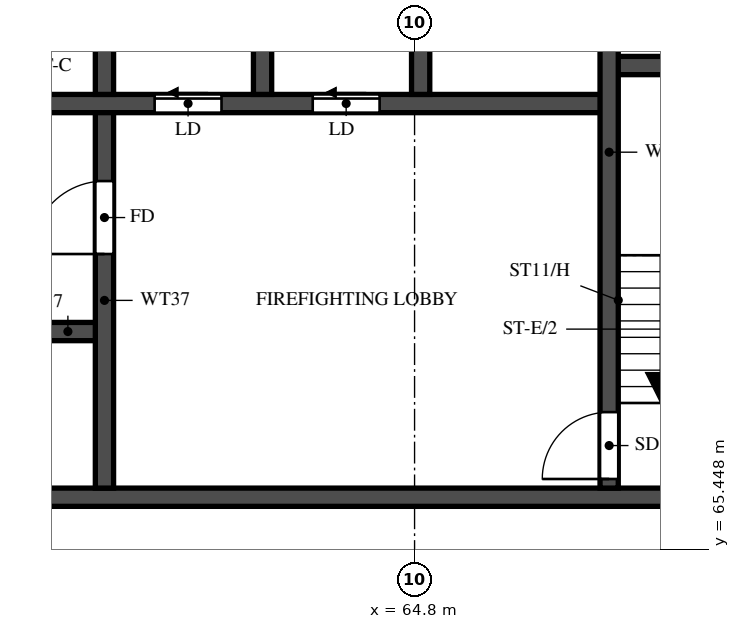
"""IFC4 building model, lengths in metres.
Left out: names, types, materials, properties, quantities, classifications, styles, units other than length and angle.
Written with IfcOpenShell. Run it as: python <this file> out.ifc"""

import sys

from ifc_helpers import new_model, si_unit, direction, frame, frame_2d, origin, place, context, subcontext, project, spatial, rectangle, extrude, element, fill, save


model = new_model("IFC4")
c1 = context("Model", 3, precision=1e-05, world=origin(), true_north=direction((0.0, 1.0)))
c2 = subcontext(c1, "Body", "Model", "MODEL_VIEW")
j1 = project(units=[si_unit("LENGTHUNIT", "METRE"), si_unit("PLANEANGLEUNIT", "RADIAN")], contexts=[c1])
p1 = place(None, origin())
s1 = spatial("IfcSite", under=j1, at=p1, CompositionType="ELEMENT")
p2 = place(p1, origin())
s2 = spatial("IfcBuilding", under=s1, at=p2, CompositionType="ELEMENT")
p3 = place(p2, frame((0.0, 0.0, 257.0)))
s3 = spatial("IfcBuildingStorey", under=s2, at=p3, CompositionType="ELEMENT", Elevation=257.0)
p4 = place(p3, frame((29.2, 66.3, 0.0), z_axis=(0.0, 0.0, 1.0), x_axis=(1.0, 0.0, 0.0)))
e1 = element("IfcWall", 1, at=p4, inside=s3, PredefinedType="SHEAR", context=c2, shape_type="SweptSolid", body=[
    extrude(rectangle(XDim=42.4, YDim=0.3, at=frame_2d((21.2, 0.0))), origin(), (0.0, 0.0, 1.0), 3.22),
])
p5 = place(p4, frame((1.425, 0.0, 0.0)))
e2 = element("IfcOpeningElement", 2, at=p5, cuts=e1, PredefinedType="OPENING", context=c2, shape_type="SweptSolid", body=[
    extrude(rectangle(XDim=1.1, YDim=2.1, at=frame_2d((0.55, 1.05))), frame((0.0, 0.16, 0.0), z_axis=(0.0, -1.0, 0.0), x_axis=(1.0, 0.0, 0.0)), (0.0, 0.0, 1.0), 0.32),
])
p6 = place(p4, frame((4.2, 0.0, 0.0)))
e3 = element("IfcOpeningElement", 3, at=p6, cuts=e1, PredefinedType="OPENING", context=c2, shape_type="SweptSolid", body=[
    extrude(rectangle(XDim=1.8, YDim=2.1, at=frame_2d((0.9, 1.05))), frame((0.0, 0.16, 0.0), z_axis=(0.0, -1.0, 0.0), x_axis=(1.0, 0.0, 0.0)), (0.0, 0.0, 1.0), 0.32),
])
p7 = place(p3, frame((35.65, 69.025, 0.0), z_axis=(0.0, 0.0, 1.0), x_axis=(1.0, 0.0, 0.0)))
e4 = element("IfcWall", 4, at=p7, inside=s3, PredefinedType="SHEAR", context=c2, shape_type="SweptSolid", body=[
    extrude(rectangle(XDim=24.05, YDim=0.3, at=frame_2d((12.025, 0.0))), origin(), (0.0, 0.0, 1.0), 3.22),
])
p8 = place(p7, frame((0.975, 0.0, 0.0)))
e5 = element("IfcOpeningElement", 5, at=p8, cuts=e4, PredefinedType="OPENING", context=c2, shape_type="SweptSolid", body=[
    extrude(rectangle(XDim=1.1, YDim=2.1, at=frame_2d((0.55, 1.05))), frame((0.0, 0.16, 0.0), z_axis=(0.0, -1.0, 0.0), x_axis=(1.0, 0.0, 0.0)), (0.0, 0.0, 1.0), 0.32),
])
p9 = place(p7, frame((3.725, 0.0, 0.0)))
e6 = element("IfcOpeningElement", 6, at=p9, cuts=e4, PredefinedType="OPENING", context=c2, shape_type="SweptSolid", body=[
    extrude(rectangle(XDim=1.1, YDim=2.1, at=frame_2d((0.55, 1.05))), frame((0.0, 0.16, 0.0), z_axis=(0.0, -1.0, 0.0), x_axis=(1.0, 0.0, 0.0)), (0.0, 0.0, 1.0), 0.32),
])
p10 = place(p7, frame((6.475, 0.0, 0.0)))
e7 = element("IfcOpeningElement", 7, at=p10, cuts=e4, PredefinedType="OPENING", context=c2, shape_type="SweptSolid", body=[
    extrude(rectangle(XDim=1.1, YDim=2.1, at=frame_2d((0.55, 1.05))), frame((0.0, 0.16, 0.0), z_axis=(0.0, -1.0, 0.0), x_axis=(1.0, 0.0, 0.0)), (0.0, 0.0, 1.0), 0.32),
])
p11 = place(p7, frame((9.225, 0.0, 0.0)))
e8 = element("IfcOpeningElement", 8, at=p11, cuts=e4, PredefinedType="OPENING", context=c2, shape_type="SweptSolid", body=[
    extrude(rectangle(XDim=1.1, YDim=2.1, at=frame_2d((0.55, 1.05))), frame((0.0, 0.16, 0.0), z_axis=(0.0, -1.0, 0.0), x_axis=(1.0, 0.0, 0.0)), (0.0, 0.0, 1.0), 0.32),
])
p12 = place(p7, frame((11.975, 0.0, 0.0)))
e9 = element("IfcOpeningElement", 9, at=p12, cuts=e4, PredefinedType="OPENING", context=c2, shape_type="SweptSolid", body=[
    extrude(rectangle(XDim=1.1, YDim=2.1, at=frame_2d((0.55, 1.05))), frame((0.0, 0.16, 0.0), z_axis=(0.0, -1.0, 0.0), x_axis=(1.0, 0.0, 0.0)), (0.0, 0.0, 1.0), 0.32),
])
p13 = place(p7, frame((14.725, 0.0, 0.0)))
e10 = element("IfcOpeningElement", 10, at=p13, cuts=e4, PredefinedType="OPENING", context=c2, shape_type="SweptSolid", body=[
    extrude(rectangle(XDim=1.1, YDim=2.1, at=frame_2d((0.55, 1.05))), frame((0.0, 0.16, 0.0), z_axis=(0.0, -1.0, 0.0), x_axis=(1.0, 0.0, 0.0)), (0.0, 0.0, 1.0), 0.32),
])
p14 = place(p7, frame((17.6, 0.0, 0.0)))
e11 = element("IfcOpeningElement", 11, at=p14, cuts=e4, PredefinedType="OPENING", context=c2, shape_type="SweptSolid", body=[
    extrude(rectangle(XDim=1.1, YDim=2.1, at=frame_2d((0.55, 1.05))), frame((0.0, 0.16, 0.0), z_axis=(0.0, -1.0, 0.0), x_axis=(1.0, 0.0, 0.0)), (0.0, 0.0, 1.0), 0.32),
])
p15 = place(p7, frame((20.6, 0.0, 0.0)))
e12 = element("IfcOpeningElement", 12, at=p15, cuts=e4, PredefinedType="OPENING", context=c2, shape_type="SweptSolid", body=[
    extrude(rectangle(XDim=1.1, YDim=2.1, at=frame_2d((0.55, 1.05))), frame((0.0, 0.16, 0.0), z_axis=(0.0, -1.0, 0.0), x_axis=(1.0, 0.0, 0.0)), (0.0, 0.0, 1.0), 0.32),
])
p16 = place(p3, frame((32.8, 72.775, 0.0), z_axis=(0.0, 0.0, 1.0), x_axis=(1.0, 0.0, 0.0)))
e13 = element("IfcWall", 13, at=p16, inside=s3, PredefinedType="SHEAR", context=c2, shape_type="SweptSolid", body=[
    extrude(rectangle(XDim=35.2, YDim=0.3, at=frame_2d((17.6, 0.0))), origin(), (0.0, 0.0, 1.0), 3.22),
])
p17 = place(p16, frame((19.8, 0.0, 0.0)))
e14 = element("IfcOpeningElement", 14, at=p17, cuts=e13, PredefinedType="OPENING", context=c2, shape_type="SweptSolid", body=[
    extrude(rectangle(XDim=1.1, YDim=2.1, at=frame_2d((0.55, 1.05))), frame((0.0, 0.16, 0.0), z_axis=(0.0, -1.0, 0.0), x_axis=(1.0, 0.0, 0.0)), (0.0, 0.0, 1.0), 0.32),
])
p18 = place(p16, frame((27.725, 0.0, 0.0)))
e15 = element("IfcOpeningElement", 15, at=p18, cuts=e13, PredefinedType="OPENING", context=c2, shape_type="SweptSolid", body=[
    extrude(rectangle(XDim=1.1, YDim=2.1, at=frame_2d((0.55, 1.05))), frame((0.0, 0.16, 0.0), z_axis=(0.0, -1.0, 0.0), x_axis=(1.0, 0.0, 0.0)), (0.0, 0.0, 1.0), 0.32),
])
p19 = place(p16, frame((30.325, 0.0, 0.0)))
e16 = element("IfcOpeningElement", 16, at=p19, cuts=e13, PredefinedType="OPENING", context=c2, shape_type="SweptSolid", body=[
    extrude(rectangle(XDim=1.1, YDim=2.1, at=frame_2d((0.55, 1.05))), frame((0.0, 0.16, 0.0), z_axis=(0.0, -1.0, 0.0), x_axis=(1.0, 0.0, 0.0)), (0.0, 0.0, 1.0), 0.32),
])
p20 = place(p16, frame((3.825, 0.0, 0.0)))
e17 = element("IfcOpeningElement", 17, at=p20, cuts=e13, PredefinedType="OPENING", context=c2, shape_type="SweptSolid", body=[
    extrude(rectangle(XDim=1.1, YDim=2.1, at=frame_2d((0.55, 1.05))), frame((0.0, 0.16, 0.0), z_axis=(0.0, -1.0, 0.0), x_axis=(1.0, 0.0, 0.0)), (0.0, 0.0, 1.0), 0.32),
])
p21 = place(p16, frame((6.575, 0.0, 0.0)))
e18 = element("IfcOpeningElement", 18, at=p21, cuts=e13, PredefinedType="OPENING", context=c2, shape_type="SweptSolid", body=[
    extrude(rectangle(XDim=1.1, YDim=2.1, at=frame_2d((0.55, 1.05))), frame((0.0, 0.16, 0.0), z_axis=(0.0, -1.0, 0.0), x_axis=(1.0, 0.0, 0.0)), (0.0, 0.0, 1.0), 0.32),
])
p22 = place(p16, frame((9.325, 0.0, 0.0)))
e19 = element("IfcOpeningElement", 19, at=p22, cuts=e13, PredefinedType="OPENING", context=c2, shape_type="SweptSolid", body=[
    extrude(rectangle(XDim=1.1, YDim=2.1, at=frame_2d((0.55, 1.05))), frame((0.0, 0.16, 0.0), z_axis=(0.0, -1.0, 0.0), x_axis=(1.0, 0.0, 0.0)), (0.0, 0.0, 1.0), 0.32),
])
p23 = place(p16, frame((12.075, 0.0, 0.0)))
e20 = element("IfcOpeningElement", 20, at=p23, cuts=e13, PredefinedType="OPENING", context=c2, shape_type="SweptSolid", body=[
    extrude(rectangle(XDim=1.1, YDim=2.1, at=frame_2d((0.55, 1.05))), frame((0.0, 0.16, 0.0), z_axis=(0.0, -1.0, 0.0), x_axis=(1.0, 0.0, 0.0)), (0.0, 0.0, 1.0), 0.32),
])
p24 = place(p16, frame((14.825, 0.0, 0.0)))
e21 = element("IfcOpeningElement", 21, at=p24, cuts=e13, PredefinedType="OPENING", context=c2, shape_type="SweptSolid", body=[
    extrude(rectangle(XDim=1.1, YDim=2.1, at=frame_2d((0.55, 1.05))), frame((0.0, 0.16, 0.0), z_axis=(0.0, -1.0, 0.0), x_axis=(1.0, 0.0, 0.0)), (0.0, 0.0, 1.0), 0.32),
])
p25 = place(p16, frame((17.575, 0.0, 0.0)))
e22 = element("IfcOpeningElement", 22, at=p25, cuts=e13, PredefinedType="OPENING", context=c2, shape_type="SweptSolid", body=[
    extrude(rectangle(XDim=1.1, YDim=2.1, at=frame_2d((0.55, 1.05))), frame((0.0, 0.16, 0.0), z_axis=(0.0, -1.0, 0.0), x_axis=(1.0, 0.0, 0.0)), (0.0, 0.0, 1.0), 0.32),
])
p26 = place(p16, frame((0.95, 0.0, 0.0)))
e23 = element("IfcOpeningElement", 23, at=p26, cuts=e13, PredefinedType="OPENING", context=c2, shape_type="SweptSolid", body=[
    extrude(rectangle(XDim=1.1, YDim=2.1, at=frame_2d((0.55, 1.05))), frame((0.0, 0.16, 0.0), z_axis=(0.0, -1.0, 0.0), x_axis=(1.0, 0.0, 0.0)), (0.0, 0.0, 1.0), 0.32),
])
p27 = place(p3, frame((68.0, 73.4, 0.0), z_axis=(0.0, 0.0, 1.0), x_axis=(1.0, 0.0, 0.0)))
e24 = element("IfcWall", 24, at=p27, inside=s3, PredefinedType="SHEAR", context=c2, shape_type="SweptSolid", body=[
    extrude(rectangle(XDim=3.1, YDim=0.3, at=frame_2d((1.55, 0.0))), origin(), (0.0, 0.0, 1.0), 3.22),
])
p28 = place(p3, frame((68.0, 66.45, 0.0), z_axis=(0.0, 0.0, 1.0), x_axis=(0.0, 1.0, 0.0)))
e25 = element("IfcWall", 25, at=p28, inside=s3, PredefinedType="SHEAR", context=c2, shape_type="SweptSolid", body=[
    extrude(rectangle(XDim=11.05, YDim=0.3, at=frame_2d((5.525, 0.0))), origin(), (0.0, 0.0, 1.0), 3.22),
])
p29 = place(p28, frame((0.15, 0.0, 0.0)))
e26 = element("IfcOpeningElement", 26, at=p29, cuts=e25, PredefinedType="OPENING", context=c2, shape_type="SweptSolid", body=[
    extrude(rectangle(XDim=1.1, YDim=2.1, at=frame_2d((0.55, 1.05))), frame((0.0, 0.16, 0.0), z_axis=(0.0, -1.0, 0.0), x_axis=(1.0, 0.0, 0.0)), (0.0, 0.0, 1.0), 0.32),
])
p30 = place(p3, frame((59.7, 66.45, 0.0), z_axis=(0.0, 0.0, 1.0), x_axis=(0.0, 1.0, 0.0)))
e27 = element("IfcWall", 27, at=p30, inside=s3, PredefinedType="SHEAR", context=c2, shape_type="SweptSolid", body=[
    extrude(rectangle(XDim=6.175, YDim=0.3, at=frame_2d((3.087, 0.0))), origin(), (0.0, 0.0, 1.0), 3.22),
])
p31 = place(p30, frame((3.85, 0.0, 0.0)))
e28 = element("IfcOpeningElement", 28, at=p31, cuts=e27, PredefinedType="OPENING", context=c2, shape_type="SweptSolid", body=[
    extrude(rectangle(XDim=1.2, YDim=2.1, at=frame_2d((0.6, 1.05))), frame((0.0, 0.16, 0.0), z_axis=(0.0, -1.0, 0.0), x_axis=(1.0, 0.0, 0.0)), (0.0, 0.0, 1.0), 0.32),
])
for number, where, z_axis, x_axis in (
    (29, (59.7, 72.925, 0.0), (0.0, 0.0, 1.0), (0.0, 1.0, 0.0)),
    (30, (62.3, 72.925, 0.0), (0.0, 0.0, 1.0), (0.0, 1.0, 0.0)),
    (31, (64.9, 72.925, 0.0), (0.0, 0.0, 1.0), (0.0, 1.0, 0.0)),
):
    element("IfcWall", number, at=place(p3, frame(where, z_axis=z_axis, x_axis=x_axis)), inside=s3, PredefinedType="SHEAR", context=c2, shape_type="SweptSolid", body=[
        extrude(rectangle(XDim=2.95, YDim=0.3, at=frame_2d((1.475, 0.0))), origin(), (0.0, 0.0, 1.0), 3.22),
    ])
p32 = place(p29, origin())
e32 = element("IfcDoor", 32, at=p32, inside=s3, OperationType="SINGLE_SWING_RIGHT", PredefinedType="DOOR", context=c2, shape_type="SweptSolid", body=[
    extrude(rectangle(XDim=1.1, YDim=2.1, at=frame_2d((0.55, 1.05))), frame((0.0, 0.025, 0.0), z_axis=(0.0, -1.0, 0.0), x_axis=(1.0, 0.0, 0.0)), (0.0, 0.0, 1.0), 0.05),
])
fill(e26, e32)
p33 = place(p31, origin())
e33 = element("IfcDoor", 33, at=p33, inside=s3, OperationType="SINGLE_SWING_LEFT", PredefinedType="DOOR", context=c2, shape_type="SweptSolid", body=[
    extrude(rectangle(XDim=1.2, YDim=2.1, at=frame_2d((0.6, 1.05))), frame((0.0, 0.025, 0.0), z_axis=(0.0, -1.0, 0.0), x_axis=(1.0, 0.0, 0.0)), (0.0, 0.0, 1.0), 0.05),
])
fill(e28, e33)
p34 = place(p18, origin())
e34 = element("IfcDoor", 34, at=p34, inside=s3, OperationType="SLIDING_TO_LEFT", PredefinedType="DOOR", context=c2, shape_type="SweptSolid", body=[
    extrude(rectangle(XDim=1.1, YDim=2.1, at=frame_2d((0.55, 1.05))), frame((0.0, 0.025, 0.0), z_axis=(0.0, -1.0, 0.0), x_axis=(1.0, 0.0, 0.0)), (0.0, 0.0, 1.0), 0.05),
])
fill(e15, e34)
p35 = place(p19, origin())
e35 = element("IfcDoor", 35, at=p35, inside=s3, OperationType="SLIDING_TO_LEFT", PredefinedType="DOOR", context=c2, shape_type="SweptSolid", body=[
    extrude(rectangle(XDim=1.1, YDim=2.1, at=frame_2d((0.55, 1.05))), frame((0.0, 0.025, 0.0), z_axis=(0.0, -1.0, 0.0), x_axis=(1.0, 0.0, 0.0)), (0.0, 0.0, 1.0), 0.05),
])
fill(e16, e35)
save(model, sys.argv[1])
